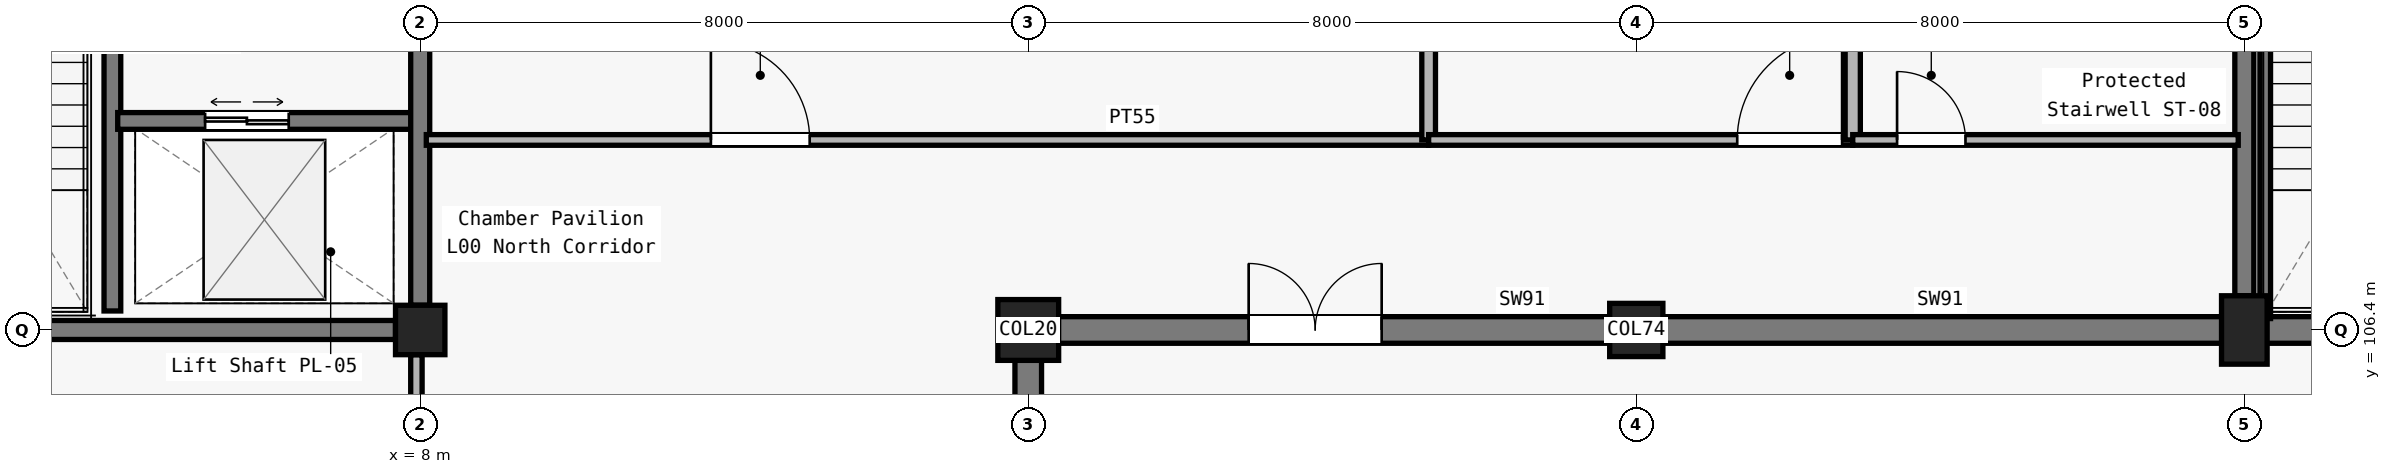
"""IFC4 building model, lengths in metres.
Left out: names, types, materials, properties, quantities, classifications, styles, units other than length and angle.
Written with IfcOpenShell. Run it as: python <this file> out.ifc"""

import sys

from ifc_helpers import new_model, si_unit, direction, frame, frame_2d, origin, origin_2d, place, context, subcontext, project, spatial, rectangle, circle, extrude, element, fill, save


model = new_model("IFC4")
c1 = context("Model", 3, precision=1e-05, world=origin(), true_north=direction((0.0, 1.0)))
c2 = subcontext(c1, "Body", "Model", "MODEL_VIEW")
j1 = project(units=[si_unit("LENGTHUNIT", "METRE"), si_unit("PLANEANGLEUNIT", "RADIAN")], contexts=[c1])
p1 = place(None, origin())
s1 = spatial("IfcSite", under=j1, at=p1, CompositionType="ELEMENT")
p2 = place(p1, origin())
s2 = spatial("IfcBuilding", under=s1, at=p2, CompositionType="ELEMENT")
p3 = place(p2, origin())
s3 = spatial("IfcBuildingStorey", under=s2, at=p3, CompositionType="ELEMENT", Elevation=0.0)
p4 = place(p3, frame((8.0, 106.4, 0.0), z_axis=(0.0, 0.0, 1.0), x_axis=(1.0, 0.0, 0.0)))
e1 = element("IfcColumn", 1, at=p4, inside=s3, PredefinedType="COLUMN", context=c2, shape_type="SweptSolid", body=[
    extrude(circle(Radius=0.325, at=origin_2d()), origin(), (0.0, 0.0, 1.0), 5.4),
])
p5 = place(p3, frame((16.0, 106.4, 0.0), z_axis=(0.0, 0.0, 1.0), x_axis=(1.0, 0.0, 0.0)))
e2 = element("IfcColumn", 2, at=p5, inside=s3, PredefinedType="COLUMN", context=c2, shape_type="SweptSolid", body=[
    extrude(rectangle(XDim=0.8, YDim=0.8, at=origin_2d()), origin(), (0.0, 0.0, 1.0), 5.4),
])
p6 = place(p3, frame((24.0, 106.4, 0.0), z_axis=(0.0, 0.0, 1.0), x_axis=(1.0, 0.0, 0.0)))
e3 = element("IfcColumn", 3, at=p6, inside=s3, PredefinedType="COLUMN", context=c2, shape_type="SweptSolid", body=[
    extrude(rectangle(XDim=0.7, YDim=0.7, at=origin_2d()), origin(), (0.0, 0.0, 1.0), 5.4),
])
p7 = place(p3, frame((32.0, 106.4, 0.0), z_axis=(0.0, 0.0, 1.0), x_axis=(1.0, 0.0, 0.0)))
e4 = element("IfcColumn", 4, at=p7, inside=s3, PredefinedType="COLUMN", context=c2, shape_type="SweptSolid", body=[
    extrude(rectangle(XDim=0.6, YDim=0.9, at=origin_2d()), origin(), (0.0, 0.0, 1.0), 5.4),
])
p8 = place(p3, frame((16.0, 106.4, 0.0), z_axis=(0.0, 0.0, 1.0), x_axis=(1.0, 0.0, 0.0)))
e5 = element("IfcWall", 5, at=p8, inside=s3, PredefinedType="SHEAR", context=c2, shape_type="SweptSolid", body=[
    extrude(rectangle(XDim=8.0, YDim=0.35, at=frame_2d((4.0, 0.0))), origin(), (0.0, 0.0, 1.0), 5.1),
])
p9 = place(p8, frame((2.9, 0.0, 0.0)))
e6 = element("IfcOpeningElement", 6, at=p9, cuts=e5, PredefinedType="OPENING", context=c2, shape_type="SweptSolid", body=[
    extrude(rectangle(XDim=1.75, YDim=2.25, at=frame_2d((0.875, 1.125))), frame((0.0, 0.185, 0.0), z_axis=(0.0, -1.0, 0.0), x_axis=(1.0, 0.0, 0.0)), (0.0, 0.0, 1.0), 0.37),
])
for number, where, z_axis, x_axis in (
    (7, (24.0, 106.4, 0.0), (0.0, 0.0, 1.0), (1.0, 0.0, 0.0)),
    (8, (32.0, 106.4, 0.0), (0.0, 0.0, 1.0), (1.0, 0.0, 0.0)),
):
    element("IfcWall", number, at=place(p3, frame(where, z_axis=z_axis, x_axis=x_axis)), inside=s3, PredefinedType="SHEAR", context=c2, shape_type="SweptSolid", body=[
        extrude(rectangle(XDim=8.0, YDim=0.35, at=frame_2d((4.0, 0.0))), origin(), (0.0, 0.0, 1.0), 5.1),
    ])
p10 = place(p3, frame((16.0, 98.8, 0.0), z_axis=(0.0, 0.0, 1.0), x_axis=(0.0, 1.0, 0.0)))
e9 = element("IfcWall", 9, at=p10, inside=s3, PredefinedType="SHEAR", context=c2, shape_type="SweptSolid", body=[
    extrude(rectangle(XDim=7.6, YDim=0.35, at=frame_2d((3.8, 0.0))), origin(), (0.0, 0.0, 1.0), 5.1),
])
p11 = place(p10, frame((2.9, 0.0, 0.0)))
e10 = element("IfcOpeningElement", 10, at=p11, cuts=e9, PredefinedType="OPENING", context=c2, shape_type="SweptSolid", body=[
    extrude(rectangle(XDim=1.75, YDim=2.25, at=frame_2d((0.875, 1.125))), frame((0.0, 0.185, 0.0), z_axis=(0.0, -1.0, 0.0), x_axis=(1.0, 0.0, 0.0)), (0.0, 0.0, 1.0), 0.37),
])
p12 = place(p3, frame((0.4, 106.4, 0.0), z_axis=(0.0, 0.0, 1.0), x_axis=(1.0, 0.0, 0.0)))
e11 = element("IfcWall", 11, at=p12, inside=s3, PredefinedType="SOLIDWALL", context=c2, shape_type="SweptSolid", body=[
    extrude(rectangle(XDim=7.275, YDim=0.25, at=frame_2d((3.638, 0.0))), origin(), (0.0, 0.0, 1.0), 4.275),
])
p13 = place(p3, frame((3.95, 106.65, 0.0), z_axis=(0.0, 0.0, 1.0), x_axis=(0.0, 1.0, 0.0)))
e12 = element("IfcWall", 12, at=p13, inside=s3, PredefinedType="SOLIDWALL", context=c2, shape_type="SweptSolid", body=[
    extrude(rectangle(XDim=7.1, YDim=0.22, at=frame_2d((3.55, 0.0))), origin(), (0.0, 0.0, 1.0), 5.1),
])
p14 = place(p13, frame((5.55, 0.0, 0.0)))
e13 = element("IfcOpeningElement", 13, at=p14, cuts=e12, PredefinedType="OPENING", context=c2, shape_type="SweptSolid", body=[
    extrude(rectangle(XDim=1.2, YDim=2.15, at=frame_2d((0.6, 1.075))), frame((0.0, 0.12, 0.0), z_axis=(0.0, -1.0, 0.0), x_axis=(1.0, 0.0, 0.0)), (0.0, 0.0, 1.0), 0.24),
])
p15 = place(p3, frame((4.02, 109.15, 0.0), z_axis=(0.0, 0.0, 1.0), x_axis=(1.0, 0.0, 0.0)))
e14 = element("IfcWall", 14, at=p15, inside=s3, PredefinedType="SOLIDWALL", context=c2, shape_type="SweptSolid", body=[
    extrude(rectangle(XDim=3.93, YDim=0.22, at=frame_2d((1.965, 0.0))), origin(), (0.0, 0.0, 1.0), 4.45),
])
p16 = place(p15, frame((1.15, 0.0, 0.0)))
e15 = element("IfcOpeningElement", 15, at=p16, cuts=e14, PredefinedType="OPENING", context=c2, shape_type="SweptSolid", body=[
    extrude(rectangle(XDim=1.1, YDim=2.2, at=frame_2d((0.55, 1.1))), frame((0.0, 0.12, 0.0), z_axis=(0.0, -1.0, 0.0), x_axis=(1.0, 0.0, 0.0)), (0.0, 0.0, 1.0), 0.24),
])
p17 = place(p3, frame((8.0, 106.725, 0.0), z_axis=(0.0, 0.0, 1.0), x_axis=(0.0, 1.0, 0.0)))
e16 = element("IfcWall", 16, at=p17, inside=s3, PredefinedType="SOLIDWALL", context=c2, shape_type="SweptSolid", body=[
    extrude(rectangle(XDim=6.875, YDim=0.25, at=frame_2d((3.438, 0.0))), origin(), (0.0, 0.0, 1.0), 4.275),
])
p18 = place(p17, frame((3.525, 0.0, 0.0)))
e17 = element("IfcOpeningElement", 17, at=p18, cuts=e16, PredefinedType="OPENING", context=c2, shape_type="SweptSolid", body=[
    extrude(rectangle(XDim=1.35, YDim=2.2, at=frame_2d((0.675, 1.1))), frame((0.0, 0.135, 0.0), z_axis=(0.0, -1.0, 0.0), x_axis=(1.0, 0.0, 0.0)), (0.0, 0.0, 1.0), 0.27),
])
p19 = place(p3, frame((32.0, 106.85, 0.0), z_axis=(0.0, 0.0, 1.0), x_axis=(0.0, 1.0, 0.0)))
e18 = element("IfcWall", 18, at=p19, inside=s3, PredefinedType="SOLIDWALL", context=c2, shape_type="SweptSolid", body=[
    extrude(rectangle(XDim=6.775, YDim=0.25, at=frame_2d((3.387, 0.0))), origin(), (0.0, 0.0, 1.0), 4.35),
])
p20 = place(p3, frame((8.08, 108.9, 0.0), z_axis=(0.0, 0.0, 1.0), x_axis=(1.0, 0.0, 0.0)))
e19 = element("IfcWall", 19, at=p20, inside=s3, PredefinedType="PARTITIONING", context=c2, shape_type="SweptSolid", body=[
    extrude(rectangle(XDim=13.188, YDim=0.14, at=frame_2d((6.594, 0.0))), origin(), (0.0, 0.0, 1.0), 4.425),
])
p21 = place(p20, frame((3.744, 0.0, 0.0)))
e20 = element("IfcOpeningElement", 20, at=p21, cuts=e19, PredefinedType="OPENING", context=c2, shape_type="SweptSolid", body=[
    extrude(rectangle(XDim=1.3, YDim=2.2, at=frame_2d((0.65, 1.1))), frame((0.0, 0.08, 0.0), z_axis=(0.0, -1.0, 0.0), x_axis=(1.0, 0.0, 0.0)), (0.0, 0.0, 1.0), 0.16),
])
p22 = place(p3, frame((21.268, 108.9, 0.0), z_axis=(0.0, 0.0, 1.0), x_axis=(0.0, 1.0, 0.0)))
e21 = element("IfcWall", 21, at=p22, inside=s3, PredefinedType="PARTITIONING", context=c2, shape_type="SweptSolid", body=[
    extrude(rectangle(XDim=5.02, YDim=0.18, at=frame_2d((2.51, 0.0))), origin(), (0.0, 0.0, 1.0), 4.495),
])
p23 = place(p3, frame((21.268, 108.9, 0.0), z_axis=(0.0, 0.0, 1.0), x_axis=(1.0, 0.0, 0.0)))
e22 = element("IfcWall", 22, at=p23, inside=s3, PredefinedType="PARTITIONING", context=c2, shape_type="SweptSolid", body=[
    extrude(rectangle(XDim=5.58, YDim=0.14, at=frame_2d((2.79, 0.0))), origin(), (0.0, 0.0, 1.0), 4.4),
])
p24 = place(p23, frame((4.06, 0.0, 0.0)))
e23 = element("IfcOpeningElement", 23, at=p24, cuts=e22, PredefinedType="OPENING", context=c2, shape_type="SweptSolid", body=[
    extrude(rectangle(XDim=1.38, YDim=2.2, at=frame_2d((0.69, 1.1))), frame((0.0, 0.08, 0.0), z_axis=(0.0, -1.0, 0.0), x_axis=(1.0, 0.0, 0.0)), (0.0, 0.0, 1.0), 0.16),
])
p25 = place(p3, frame((26.848, 108.9, 0.0), z_axis=(0.0, 0.0, 1.0), x_axis=(0.0, 1.0, 0.0)))
e24 = element("IfcWall", 24, at=p25, inside=s3, PredefinedType="PARTITIONING", context=c2, shape_type="SweptSolid", body=[
    extrude(rectangle(XDim=5.02, YDim=0.2, at=frame_2d((2.51, 0.0))), origin(), (0.0, 0.0, 1.0), 4.47),
])
p26 = place(p3, frame((26.848, 108.9, 0.0), z_axis=(0.0, 0.0, 1.0), x_axis=(1.0, 0.0, 0.0)))
e25 = element("IfcWall", 25, at=p26, inside=s3, PredefinedType="PARTITIONING", context=c2, shape_type="SweptSolid", body=[
    extrude(rectangle(XDim=5.072, YDim=0.14, at=frame_2d((2.536, 0.0))), origin(), (0.0, 0.0, 1.0), 4.475),
])
p27 = place(p26, frame((0.583, 0.0, 0.0)))
e26 = element("IfcOpeningElement", 26, at=p27, cuts=e25, PredefinedType="OPENING", context=c2, shape_type="SweptSolid", body=[
    extrude(rectangle(XDim=0.9, YDim=2.05, at=frame_2d((0.45, 1.025))), frame((0.0, 0.08, 0.0), z_axis=(0.0, -1.0, 0.0), x_axis=(1.0, 0.0, 0.0)), (0.0, 0.0, 1.0), 0.16),
])
p28 = place(p3, frame((7.95, 68.85, 0.0), z_axis=(0.0, 0.0, 1.0), x_axis=(0.0, 1.0, 0.0)))
e27 = element("IfcWall", 27, at=p28, inside=s3, PredefinedType="PARTITIONING", context=c2, shape_type="SweptSolid", body=[
    extrude(rectangle(XDim=37.225, YDim=0.15, at=frame_2d((18.612, 0.0))), origin(), (0.0, 0.0, 1.0), 3.29),
])
p29 = place(p28, frame((3.35, 0.0, 0.0)))
e28 = element("IfcOpeningElement", 28, at=p29, cuts=e27, PredefinedType="OPENING", context=c2, shape_type="SweptSolid", body=[
    extrude(rectangle(XDim=0.94, YDim=2.05, at=frame_2d((0.47, 1.025))), frame((0.0, 0.085, 0.0), z_axis=(0.0, -1.0, 0.0), x_axis=(1.0, 0.0, 0.0)), (0.0, 0.0, 1.0), 0.17),
])
p30 = place(p28, frame((26.15, 0.0, 0.0)))
e29 = element("IfcOpeningElement", 29, at=p30, cuts=e27, PredefinedType="OPENING", context=c2, shape_type="SweptSolid", body=[
    extrude(rectangle(XDim=0.96, YDim=2.05, at=frame_2d((0.48, 1.025))), frame((0.0, 0.085, 0.0), z_axis=(0.0, -1.0, 0.0), x_axis=(1.0, 0.0, 0.0)), (0.0, 0.0, 1.0), 0.17),
])
p31 = place(p3, frame((32.275, 106.55, 0.0), z_axis=(0.0, 0.0, 1.0), x_axis=(0.0, 1.0, 0.0)))
e30 = element("IfcWall", 30, at=p31, inside=s3, PredefinedType="SOLIDWALL", context=c2, shape_type="SweptSolid", body=[
    extrude(rectangle(XDim=7.3, YDim=0.14, at=frame_2d((3.65, 0.0))), origin(), (0.0, 0.0, 1.0), 5.1),
])
p32 = place(p16, origin())
e31 = element("IfcDoor", 31, at=p32, inside=s3, OperationType="DOUBLE_DOOR_SLIDING", PredefinedType="DOOR", context=c2, shape_type="SweptSolid", body=[
    extrude(rectangle(XDim=1.1, YDim=2.2, at=frame_2d((0.55, 1.1))), frame((0.0, 0.025, 0.0), z_axis=(0.0, -1.0, 0.0), x_axis=(1.0, 0.0, 0.0)), (0.0, 0.0, 1.0), 0.05),
])
fill(e15, e31)
p33 = place(p21, origin())
e32 = element("IfcDoor", 32, at=p33, inside=s3, OperationType="SINGLE_SWING_LEFT", PredefinedType="DOOR", context=c2, shape_type="SweptSolid", body=[
    extrude(rectangle(XDim=1.3, YDim=2.2, at=frame_2d((0.65, 1.1))), frame((0.0, 0.025, 0.0), z_axis=(0.0, -1.0, 0.0), x_axis=(1.0, 0.0, 0.0)), (0.0, 0.0, 1.0), 0.05),
])
fill(e20, e32)
p34 = place(p24, origin())
e33 = element("IfcDoor", 33, at=p34, inside=s3, OperationType="SINGLE_SWING_RIGHT", PredefinedType="DOOR", context=c2, shape_type="SweptSolid", body=[
    extrude(rectangle(XDim=1.38, YDim=2.2, at=frame_2d((0.69, 1.1))), frame((0.0, 0.025, 0.0), z_axis=(0.0, -1.0, 0.0), x_axis=(1.0, 0.0, 0.0)), (0.0, 0.0, 1.0), 0.05),
])
fill(e23, e33)
p35 = place(p27, origin())
e34 = element("IfcDoor", 34, at=p35, inside=s3, OperationType="SINGLE_SWING_LEFT", PredefinedType="DOOR", context=c2, shape_type="SweptSolid", body=[
    extrude(rectangle(XDim=0.9, YDim=2.05, at=frame_2d((0.45, 1.025))), frame((0.0, 0.025, 0.0), z_axis=(0.0, -1.0, 0.0), x_axis=(1.0, 0.0, 0.0)), (0.0, 0.0, 1.0), 0.05),
])
fill(e26, e34)
p36 = place(p9, origin())
e35 = element("IfcDoor", 35, at=p36, inside=s3, OperationType="DOUBLE_DOOR_SINGLE_SWING", PredefinedType="DOOR", context=c2, shape_type="SweptSolid", body=[
    extrude(rectangle(XDim=1.75, YDim=2.25, at=frame_2d((0.875, 1.125))), frame((0.0, 0.025, 0.0), z_axis=(0.0, -1.0, 0.0), x_axis=(1.0, 0.0, 0.0)), (0.0, 0.0, 1.0), 0.05),
])
fill(e6, e35)
save(model, sys.argv[1])
